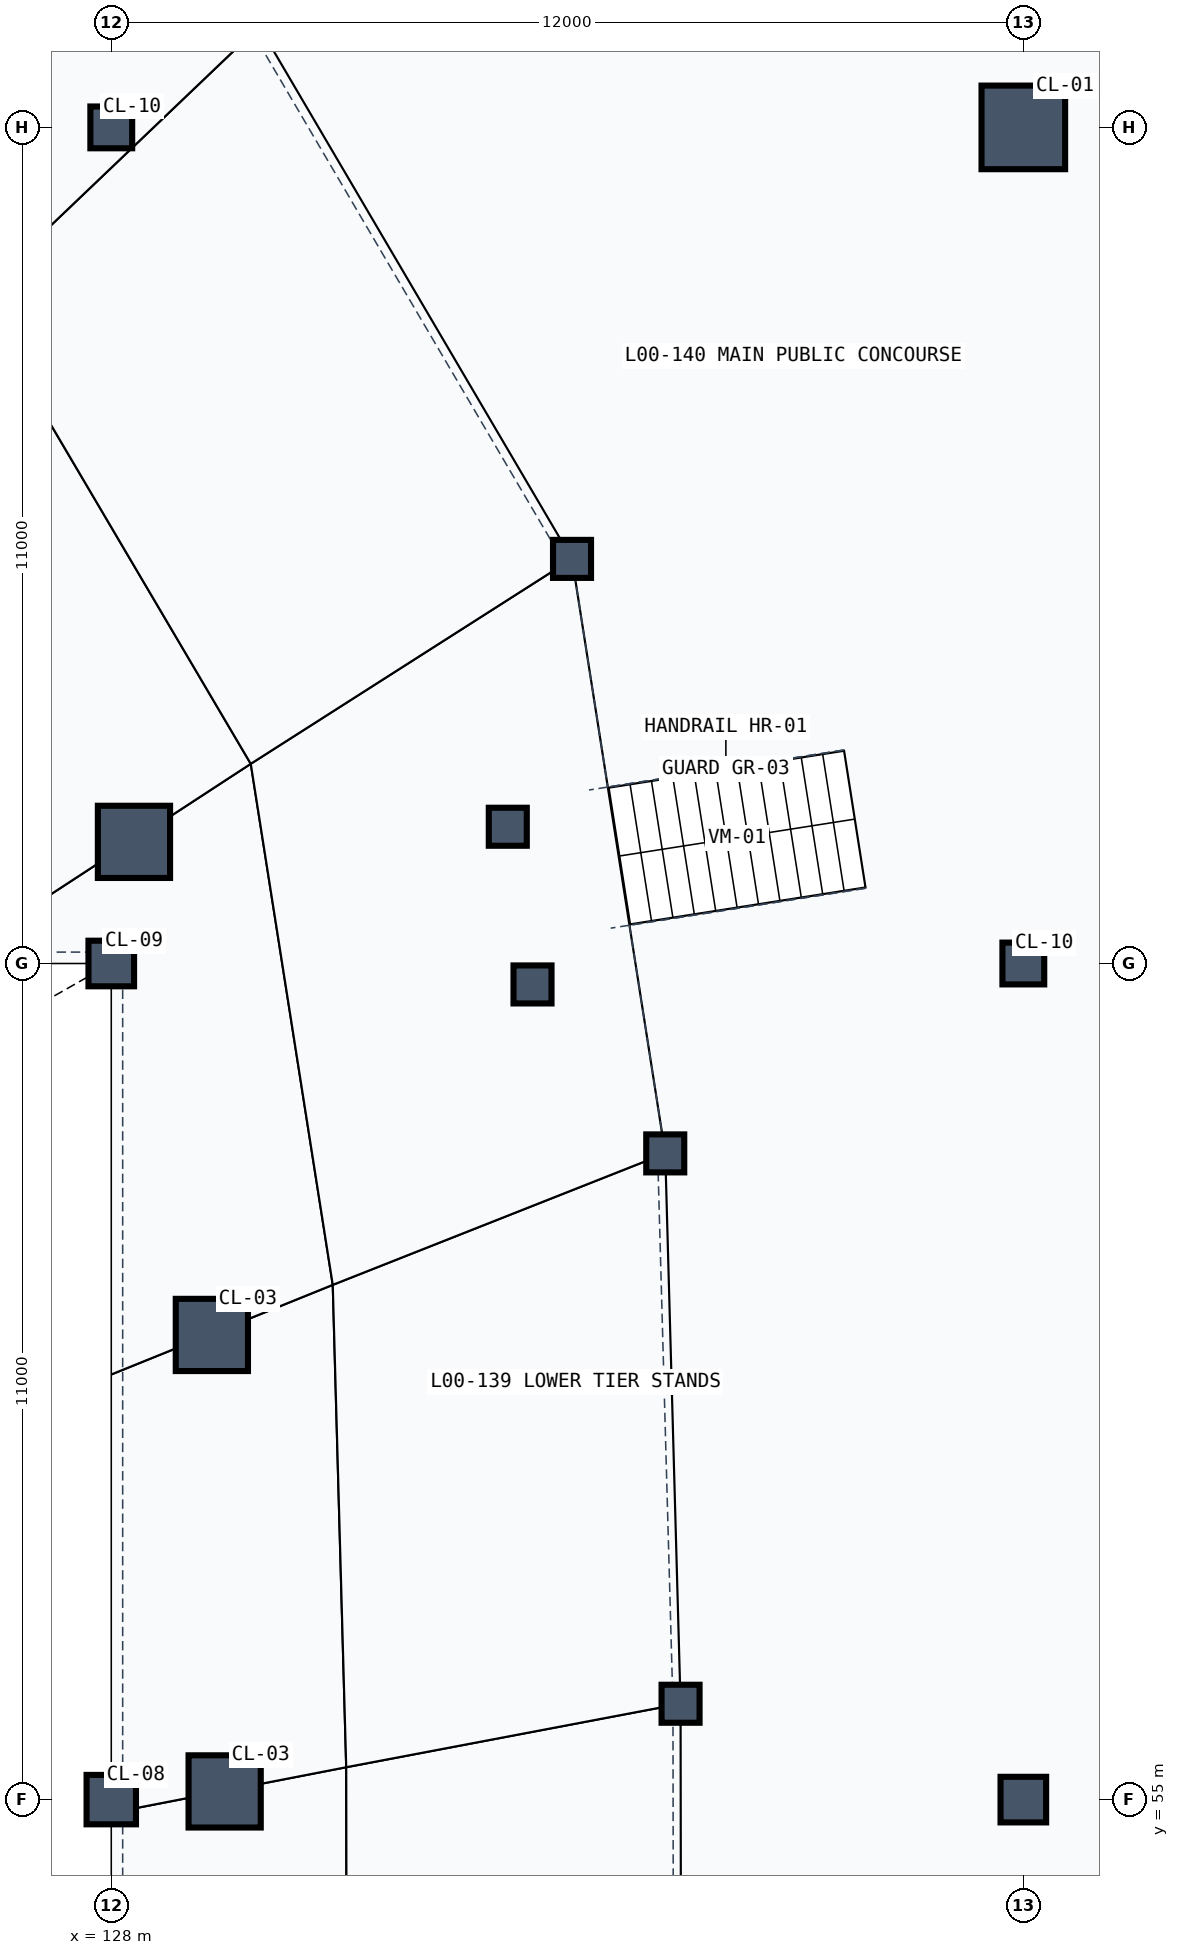
"""IFC4 building model, lengths in metres.
Left out: names, types, materials, properties, quantities, classifications, styles, units other than length and angle.
Written with IfcOpenShell. Run it as: python <this file> out.ifc"""

import sys

from ifc_helpers import new_model, si_unit, direction, frame, origin, origin_2d, place, context, subcontext, project, spatial, rectangle, extrude, element, save


model = new_model("IFC4")
c1 = context("Model", 3, precision=1e-05, world=origin(), true_north=direction((0.0, 1.0)))
c2 = subcontext(c1, "Body", "Model", "MODEL_VIEW")
j1 = project(units=[si_unit("LENGTHUNIT", "METRE"), si_unit("PLANEANGLEUNIT", "RADIAN")], contexts=[c1])
p1 = place(None, origin())
s1 = spatial("IfcSite", under=j1, at=p1, CompositionType="ELEMENT")
p2 = place(p1, origin())
s2 = spatial("IfcBuilding", under=s1, at=p2, CompositionType="ELEMENT")
p3 = place(p2, origin())
s3 = spatial("IfcBuildingStorey", under=s2, at=p3, CompositionType="ELEMENT", Elevation=0.0)
p4 = place(p3, frame((128.0, 55.0, 0.0), z_axis=(0.0, 0.0, 1.0), x_axis=(1.0, 0.0, 0.0)))
e1 = element("IfcColumn", 1, at=p4, inside=s3, PredefinedType="COLUMN", context=c2, shape_type="SweptSolid", body=[
    extrude(rectangle(XDim=0.65, YDim=0.65, at=origin_2d()), origin(), (0.0, 0.0, 1.0), 5.4),
])
p5 = place(p3, frame((128.0, 66.0, 0.0), z_axis=(0.0, 0.0, 1.0), x_axis=(1.0, 0.0, 0.0)))
e2 = element("IfcColumn", 2, at=p5, inside=s3, PredefinedType="COLUMN", context=c2, shape_type="SweptSolid", body=[
    extrude(rectangle(XDim=0.6, YDim=0.6, at=origin_2d()), origin(), (0.0, 0.0, 1.0), 5.4),
])
p6 = place(p3, frame((128.0, 77.0, 0.0), z_axis=(0.0, 0.0, 1.0), x_axis=(1.0, 0.0, 0.0)))
e3 = element("IfcColumn", 3, at=p6, inside=s3, PredefinedType="COLUMN", context=c2, shape_type="SweptSolid", body=[
    extrude(rectangle(XDim=0.55, YDim=0.55, at=origin_2d()), origin(), (0.0, 0.0, 1.0), 5.4),
])
p7 = place(p3, frame((140.0, 55.0, 0.0), z_axis=(0.0, 0.0, 1.0), x_axis=(1.0, 0.0, 0.0)))
e4 = element("IfcColumn", 4, at=p7, inside=s3, PredefinedType="COLUMN", context=c2, shape_type="SweptSolid", body=[
    extrude(rectangle(XDim=0.6, YDim=0.6, at=origin_2d()), origin(), (0.0, 0.0, 1.0), 5.4),
])
p8 = place(p3, frame((140.0, 66.0, 0.0), z_axis=(0.0, 0.0, 1.0), x_axis=(1.0, 0.0, 0.0)))
e5 = element("IfcColumn", 5, at=p8, inside=s3, PredefinedType="COLUMN", context=c2, shape_type="SweptSolid", body=[
    extrude(rectangle(XDim=0.55, YDim=0.55, at=origin_2d()), origin(), (0.0, 0.0, 1.0), 5.4),
])
p9 = place(p3, frame((140.0, 77.0, 0.0), z_axis=(0.0, 0.0, 1.0), x_axis=(1.0, 0.0, 0.0)))
e6 = element("IfcColumn", 6, at=p9, inside=s3, PredefinedType="COLUMN", context=c2, shape_type="SweptSolid", body=[
    extrude(rectangle(XDim=1.1, YDim=1.1, at=origin_2d()), origin(), (0.0, 0.0, 1.0), 5.4),
])
for number, where, z_axis, x_axis in (
    (7, (129.492, 55.108, 0.0), (0.0, 0.0, 1.0), (1.0, 0.0, 0.0)),
    (8, (129.323, 61.113, 0.0), (0.0, 0.0, 1.0), (1.0, 0.0, 0.0)),
    (9, (128.299, 67.6, 0.0), (0.0, 0.0, 1.0), (1.0, 0.0, 0.0)),
):
    element("IfcColumn", number, at=place(p3, frame(where, z_axis=z_axis, x_axis=x_axis)), inside=s3, PredefinedType="COLUMN", context=c2, shape_type="SweptSolid", body=[
        extrude(rectangle(XDim=0.95, YDim=0.95, at=origin_2d()), origin(), (0.0, 0.0, 1.0), 5.4),
    ])
for number, where, z_axis, x_axis in (
    (10, (135.49, 56.261, 0.0), (0.0, 0.0, 1.0), (1.0, 0.0, 0.0)),
    (11, (135.289, 63.502, 0.0), (0.0, 0.0, 1.0), (1.0, 0.0, 0.0)),
):
    element("IfcColumn", number, at=place(p3, frame(where, z_axis=z_axis, x_axis=x_axis)), inside=s3, PredefinedType="COLUMN", context=c2, shape_type="SweptSolid", body=[
        extrude(rectangle(XDim=0.5, YDim=0.5, at=origin_2d()), origin(), (0.0, 0.0, 1.0), 1.28),
    ])
for number, where, z_axis, x_axis in (
    (12, (133.542, 65.725, 0.0), (0.0, 0.0, 1.0), (1.0, 0.0, 0.0)),
    (13, (133.217, 67.799, 0.0), (0.0, 0.0, 1.0), (1.0, 0.0, 0.0)),
):
    element("IfcColumn", number, at=place(p3, frame(where, z_axis=z_axis, x_axis=x_axis)), inside=s3, PredefinedType="COLUMN", context=c2, shape_type="SweptSolid", body=[
        extrude(rectangle(XDim=0.5, YDim=0.5, at=origin_2d()), origin(), (0.0, 0.0, 1.0), 1.05),
    ])
p10 = place(p3, frame((134.062, 71.323, 0.0), z_axis=(0.0, 0.0, 1.0), x_axis=(1.0, 0.0, 0.0)))
e14 = element("IfcColumn", 14, at=p10, inside=s3, PredefinedType="COLUMN", context=c2, shape_type="SweptSolid", body=[
    extrude(rectangle(XDim=0.5, YDim=0.5, at=origin_2d()), origin(), (0.0, 0.0, 1.0), 1.28),
])
save(model, sys.argv[1])
